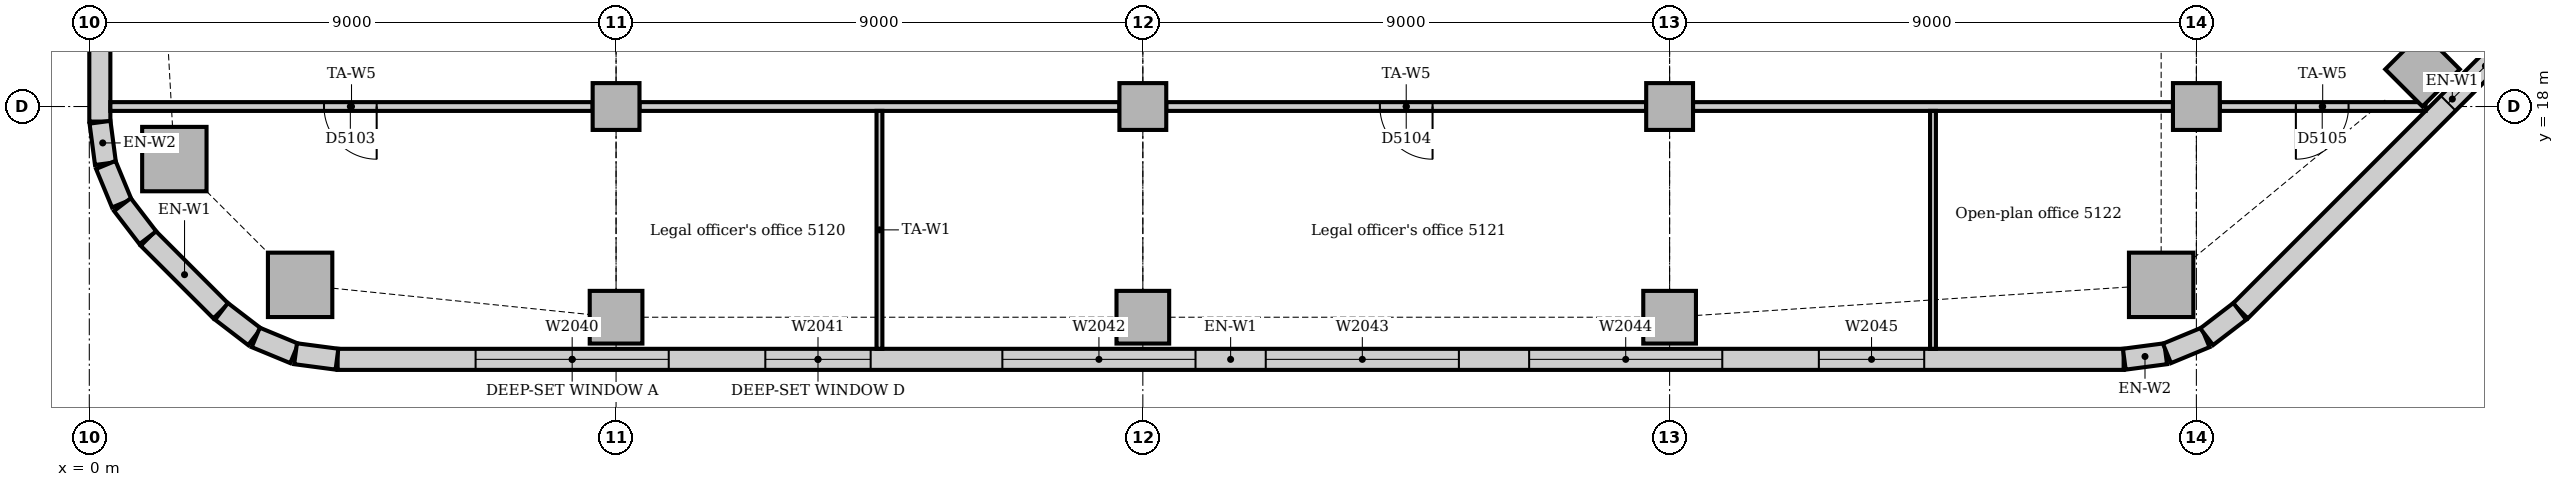
"""IFC4 building model, lengths in metres.
Left out: names, types, materials, properties, quantities, classifications, styles, units other than length and angle.
Written with IfcOpenShell. Run it as: python <this file> out.ifc"""

import sys

from ifc_helpers import new_model, si_unit, direction, frame, frame_2d, origin, origin_2d, place, context, subcontext, project, spatial, rectangle, extrude, element, fill, save


model = new_model("IFC4")
c1 = context("Model", 3, precision=1e-05, world=origin(), true_north=direction((0.0, 1.0)))
c2 = subcontext(c1, "Body", "Model", "MODEL_VIEW")
j1 = project(units=[si_unit("LENGTHUNIT", "METRE"), si_unit("PLANEANGLEUNIT", "RADIAN")], contexts=[c1])
p1 = place(None, origin())
s1 = spatial("IfcSite", under=j1, at=p1, CompositionType="ELEMENT")
p2 = place(p1, origin())
s2 = spatial("IfcBuilding", under=s1, at=p2, CompositionType="ELEMENT")
p3 = place(p2, frame((0.0, 0.0, 214.0)))
s3 = spatial("IfcBuildingStorey", under=s2, at=p3, CompositionType="ELEMENT", Elevation=214.0)
for number, where, z_axis, x_axis in (
    (1, (3.602, 14.953, 0.0), (0.0, 0.0, 1.0), (1.0, 0.0, 0.0)),
    (2, (35.398, 14.953, 0.0), (0.0, 0.0, 1.0), (1.0, 0.0, 0.0)),
    (3, (1.453, 17.102, 0.0), (0.0, 0.0, 1.0), (1.0, 0.0, 0.0)),
):
    element("IfcColumn", number, at=place(p3, frame(where, z_axis=z_axis, x_axis=x_axis)), inside=s3, PredefinedType="COLUMN", context=c2, shape_type="SweptSolid", body=[
        extrude(rectangle(XDim=1.1, YDim=1.1, at=origin_2d()), origin(), (0.0, 0.0, 1.0), 3.85),
    ])
for number, where, z_axis, x_axis in (
    (4, (9.0, 14.4, 0.0), (0.0, 0.0, 1.0), (1.0, 0.0, 0.0)),
    (5, (18.0, 14.4, 0.0), (0.0, 0.0, 1.0), (1.0, 0.0, 0.0)),
    (6, (27.0, 14.4, 0.0), (0.0, 0.0, 1.0), (1.0, 0.0, 0.0)),
    (7, (39.864, 18.636, 0.0), (0.0, 0.0, 1.0), (0.707, 0.707, 0.0)),
):
    element("IfcColumn", number, at=place(p3, frame(where, z_axis=z_axis, x_axis=x_axis)), inside=s3, PredefinedType="COLUMN", context=c2, shape_type="SweptSolid", body=[
        extrude(rectangle(XDim=0.9, YDim=0.9, at=origin_2d()), origin(), (0.0, 0.0, 1.0), 3.85),
    ])
for number, where, z_axis, x_axis in (
    (8, (9.0, 18.0, 0.0), (0.0, 0.0, 1.0), (1.0, 0.0, 0.0)),
    (9, (18.0, 18.0, 0.0), (0.0, 0.0, 1.0), (1.0, 0.0, 0.0)),
    (10, (27.0, 18.0, 0.0), (0.0, 0.0, 1.0), (1.0, 0.0, 0.0)),
    (11, (36.0, 18.0, 0.0), (0.0, 0.0, 1.0), (1.0, 0.0, 0.0)),
):
    element("IfcColumn", number, at=place(p3, frame(where, z_axis=z_axis, x_axis=x_axis)), inside=s3, PredefinedType="COLUMN", context=c2, shape_type="SweptSolid", body=[
        extrude(rectangle(XDim=0.8, YDim=0.8, at=origin_2d()), origin(), (0.0, 0.0, 1.0), 3.85),
    ])
p4 = place(p3, frame((4.243, 13.68, 0.0), z_axis=(0.0, 0.0, 1.0), x_axis=(1.0, 0.0, 0.0)))
e12 = element("IfcWall", 12, at=p4, inside=s3, PredefinedType="STANDARD", context=c2, shape_type="SweptSolid", body=[
    extrude(rectangle(XDim=30.515, YDim=0.36, at=frame_2d((15.257, 0.0))), origin(), (0.0, 0.0, 1.0), 3.85),
])
p5 = place(p4, frame((2.357, 0.0, 0.9)))
e13 = element("IfcOpeningElement", 13, at=p5, cuts=e12, PredefinedType="OPENING", context=c2, shape_type="SweptSolid", body=[
    extrude(rectangle(XDim=3.3, YDim=1.6, at=frame_2d((1.65, 0.8))), frame((0.0, 0.19, 0.0), z_axis=(0.0, -1.0, 0.0), x_axis=(1.0, 0.0, 0.0)), (0.0, 0.0, 1.0), 0.38),
])
p6 = place(p4, frame((7.307, 0.0, 0.9)))
e14 = element("IfcOpeningElement", 14, at=p6, cuts=e12, PredefinedType="OPENING", context=c2, shape_type="SweptSolid", body=[
    extrude(rectangle(XDim=1.8, YDim=1.6, at=frame_2d((0.9, 0.8))), frame((0.0, 0.19, 0.0), z_axis=(0.0, -1.0, 0.0), x_axis=(1.0, 0.0, 0.0)), (0.0, 0.0, 1.0), 0.38),
])
p7 = place(p4, frame((11.357, 0.0, 0.9)))
e15 = element("IfcOpeningElement", 15, at=p7, cuts=e12, PredefinedType="OPENING", context=c2, shape_type="SweptSolid", body=[
    extrude(rectangle(XDim=3.3, YDim=1.6, at=frame_2d((1.65, 0.8))), frame((0.0, 0.19, 0.0), z_axis=(0.0, -1.0, 0.0), x_axis=(1.0, 0.0, 0.0)), (0.0, 0.0, 1.0), 0.38),
])
p8 = place(p4, frame((15.857, 0.0, 0.9)))
e16 = element("IfcOpeningElement", 16, at=p8, cuts=e12, PredefinedType="OPENING", context=c2, shape_type="SweptSolid", body=[
    extrude(rectangle(XDim=3.3, YDim=1.6, at=frame_2d((1.65, 0.8))), frame((0.0, 0.19, 0.0), z_axis=(0.0, -1.0, 0.0), x_axis=(1.0, 0.0, 0.0)), (0.0, 0.0, 1.0), 0.38),
])
p9 = place(p4, frame((20.357, 0.0, 0.9)))
e17 = element("IfcOpeningElement", 17, at=p9, cuts=e12, PredefinedType="OPENING", context=c2, shape_type="SweptSolid", body=[
    extrude(rectangle(XDim=3.3, YDim=1.6, at=frame_2d((1.65, 0.8))), frame((0.0, 0.19, 0.0), z_axis=(0.0, -1.0, 0.0), x_axis=(1.0, 0.0, 0.0)), (0.0, 0.0, 1.0), 0.38),
])
p10 = place(p4, frame((25.307, 0.0, 0.9)))
e18 = element("IfcOpeningElement", 18, at=p10, cuts=e12, PredefinedType="OPENING", context=c2, shape_type="SweptSolid", body=[
    extrude(rectangle(XDim=1.8, YDim=1.6, at=frame_2d((0.9, 0.8))), frame((0.0, 0.19, 0.0), z_axis=(0.0, -1.0, 0.0), x_axis=(1.0, 0.0, 0.0)), (0.0, 0.0, 1.0), 0.38),
])
p11 = place(p3, frame((36.751, 14.506, 0.0), z_axis=(0.0, 0.0, 1.0), x_axis=(0.707106781187, 0.707106781187, 0.0)))
e19 = element("IfcWall", 19, at=p11, inside=s3, PredefinedType="STANDARD", context=c2, shape_type="SweptSolid", body=[
    extrude(rectangle(XDim=10.243, YDim=0.36, at=frame_2d((5.121, 0.0))), origin(), (0.0, 0.0, 1.0), 3.85),
])
p12 = place(p11, frame((5.021, 0.0, 0.9)))
e20 = element("IfcOpeningElement", 20, at=p12, cuts=e19, PredefinedType="OPENING", context=c2, shape_type="SweptSolid", body=[
    extrude(rectangle(XDim=1.8, YDim=1.6, at=frame_2d((0.9, 0.8))), frame((0.0, 0.19, 0.0), z_axis=(0.0, -1.0, 0.0), x_axis=(1.0, 0.0, 0.0)), (0.0, 0.0, 1.0), 0.38),
])
p13 = place(p3, frame((0.18, 21.0, 0.0), z_axis=(0.0, 0.0, 1.0), x_axis=(0.0, -1.0, 0.0)))
e21 = element("IfcWall", 21, at=p13, inside=s3, PredefinedType="STANDARD", context=c2, shape_type="SweptSolid", body=[
    extrude(rectangle(XDim=3.257, YDim=0.36, at=frame_2d((1.629, 0.0))), origin(), (0.0, 0.0, 1.0), 3.85),
])
p14 = place(p3, frame((1.006, 15.749, 0.0), z_axis=(0.0, 0.0, 1.0), x_axis=(0.707106781187, -0.707106781187, 0.0)))
e22 = element("IfcWall", 22, at=p14, inside=s3, PredefinedType="STANDARD", context=c2, shape_type="SweptSolid", body=[
    extrude(rectangle(XDim=1.757, YDim=0.36, at=frame_2d((0.879, 0.0))), origin(), (0.0, 0.0, 1.0), 3.85),
])
for number, where, z_axis, x_axis in (
    (23, (34.769, 13.683, 0.0), (0.0, 0.0, 1.0), (0.991, 0.131, 0.0)),
    (24, (35.497, 13.782, 0.0), (0.0, 0.0, 1.0), (0.924, 0.383, 0.0)),
):
    element("IfcWall", number, at=place(p3, frame(where, z_axis=z_axis, x_axis=x_axis)), inside=s3, PredefinedType="STANDARD", context=c2, shape_type="SweptSolid", body=[
        extrude(rectangle(XDim=0.713, YDim=0.36, at=frame_2d((0.356, 0.0))), origin(), (0.0, 0.0, 1.0), 3.85),
    ])
p15 = place(p3, frame((36.175, 14.066, 0.0), z_axis=(0.0, 0.0, 1.0), x_axis=(0.793321924995, 0.608802368033, 0.0)))
e25 = element("IfcWall", 25, at=p15, inside=s3, PredefinedType="STANDARD", context=c2, shape_type="SweptSolid", body=[
    extrude(rectangle(XDim=0.713, YDim=0.36, at=frame_2d((0.357, 0.0))), origin(), (0.0, 0.0, 1.0), 3.85),
])
for number, where, z_axis, x_axis in (
    (26, (0.183, 17.731, 0.0), (0.0, 0.0, 1.0), (0.131, -0.991, 0.0)),
    (27, (0.282, 17.003, 0.0), (0.0, 0.0, 1.0), (0.383, -0.924, 0.0)),
):
    element("IfcWall", number, at=place(p3, frame(where, z_axis=z_axis, x_axis=x_axis)), inside=s3, PredefinedType="STANDARD", context=c2, shape_type="SweptSolid", body=[
        extrude(rectangle(XDim=0.713, YDim=0.36, at=frame_2d((0.356, 0.0))), origin(), (0.0, 0.0, 1.0), 3.85),
    ])
for number, where, z_axis, x_axis in (
    (28, (0.566, 16.325, 0.0), (0.0, 0.0, 1.0), (0.609, -0.793, 0.0)),
    (29, (2.259, 14.5, 0.0), (0.0, 0.0, 1.0), (0.793, -0.609, 0.0)),
):
    element("IfcWall", number, at=place(p3, frame(where, z_axis=z_axis, x_axis=x_axis)), inside=s3, PredefinedType="STANDARD", context=c2, shape_type="SweptSolid", body=[
        extrude(rectangle(XDim=0.713, YDim=0.36, at=frame_2d((0.357, 0.0))), origin(), (0.0, 0.0, 1.0), 3.85),
    ])
for number, where, z_axis, x_axis in (
    (30, (2.844, 14.055, 0.0), (0.0, 0.0, 1.0), (0.924, -0.383, 0.0)),
    (31, (3.524, 13.776, 0.0), (0.0, 0.0, 1.0), (0.991, -0.131, 0.0)),
):
    element("IfcWall", number, at=place(p3, frame(where, z_axis=z_axis, x_axis=x_axis)), inside=s3, PredefinedType="STANDARD", context=c2, shape_type="SweptSolid", body=[
        extrude(rectangle(XDim=0.713, YDim=0.36, at=frame_2d((0.356, 0.0))), origin(), (0.0, 0.0, 1.0), 3.85),
    ])
p16 = place(p3, frame((36.4, 18.0, 0.0), z_axis=(0.0, 0.0, 1.0), x_axis=(1.0, 0.0, 0.0)))
e32 = element("IfcWall", 32, at=p16, inside=s3, PredefinedType="PARTITIONING", context=c2, shape_type="SweptSolid", body=[
    extrude(rectangle(XDim=3.516, YDim=0.15, at=frame_2d((1.758, 0.0))), origin(), (0.0, 0.0, 1.0), 3.602),
])
p17 = place(p16, frame((1.3, 0.0, 0.0)))
e33 = element("IfcOpeningElement", 33, at=p17, cuts=e32, PredefinedType="OPENING", context=c2, shape_type="SweptSolid", body=[
    extrude(rectangle(XDim=0.9, YDim=2.1, at=frame_2d((0.45, 1.05))), frame((0.0, 0.085, 0.0), z_axis=(0.0, -1.0, 0.0), x_axis=(1.0, 0.0, 0.0)), (0.0, 0.0, 1.0), 0.17),
])
p18 = place(p3, frame((27.4, 18.0, 0.0), z_axis=(0.0, 0.0, 1.0), x_axis=(1.0, 0.0, 0.0)))
e34 = element("IfcWall", 34, at=p18, inside=s3, PredefinedType="PARTITIONING", context=c2, shape_type="SweptSolid", body=[
    extrude(rectangle(XDim=8.2, YDim=0.15, at=frame_2d((4.1, 0.0))), origin(), (0.0, 0.0, 1.0), 3.254),
])
p19 = place(p3, frame((18.4, 18.0, 0.0), z_axis=(0.0, 0.0, 1.0), x_axis=(1.0, 0.0, 0.0)))
e35 = element("IfcWall", 35, at=p19, inside=s3, PredefinedType="PARTITIONING", context=c2, shape_type="SweptSolid", body=[
    extrude(rectangle(XDim=8.2, YDim=0.15, at=frame_2d((4.1, 0.0))), origin(), (0.0, 0.0, 1.0), 3.254),
])
p20 = place(p19, frame((3.65, 0.0, 0.0)))
e36 = element("IfcOpeningElement", 36, at=p20, cuts=e35, PredefinedType="OPENING", context=c2, shape_type="SweptSolid", body=[
    extrude(rectangle(XDim=0.9, YDim=2.1, at=frame_2d((0.45, 1.05))), frame((0.0, 0.085, 0.0), z_axis=(0.0, -1.0, 0.0), x_axis=(1.0, 0.0, 0.0)), (0.0, 0.0, 1.0), 0.17),
])
p21 = place(p3, frame((9.4, 18.0, 0.0), z_axis=(0.0, 0.0, 1.0), x_axis=(1.0, 0.0, 0.0)))
e37 = element("IfcWall", 37, at=p21, inside=s3, PredefinedType="PARTITIONING", context=c2, shape_type="SweptSolid", body=[
    extrude(rectangle(XDim=8.2, YDim=0.15, at=frame_2d((4.1, 0.0))), origin(), (0.0, 0.0, 1.0), 3.254),
])
p22 = place(p3, frame((0.36, 18.0, 0.0), z_axis=(0.0, 0.0, 1.0), x_axis=(1.0, 0.0, 0.0)))
e38 = element("IfcWall", 38, at=p22, inside=s3, PredefinedType="PARTITIONING", context=c2, shape_type="SweptSolid", body=[
    extrude(rectangle(XDim=8.24, YDim=0.15, at=frame_2d((4.12, 0.0))), origin(), (0.0, 0.0, 1.0), 3.254),
])
p23 = place(p22, frame((3.65, 0.0, 0.0)))
e39 = element("IfcOpeningElement", 39, at=p23, cuts=e38, PredefinedType="OPENING", context=c2, shape_type="SweptSolid", body=[
    extrude(rectangle(XDim=0.9, YDim=2.1, at=frame_2d((0.45, 1.05))), frame((0.0, 0.085, 0.0), z_axis=(0.0, -1.0, 0.0), x_axis=(1.0, 0.0, 0.0)), (0.0, 0.0, 1.0), 0.17),
])
for number, where, z_axis, x_axis in (
    (40, (13.5, 13.86, 0.0), (0.0, 0.0, 1.0), (0.0, 1.0, 0.0)),
    (41, (31.5, 13.86, 0.0), (0.0, 0.0, 1.0), (0.0, 1.0, 0.0)),
):
    element("IfcWall", number, at=place(p3, frame(where, z_axis=z_axis, x_axis=x_axis)), inside=s3, PredefinedType="PARTITIONING", context=c2, shape_type="SweptSolid", body=[
        extrude(rectangle(XDim=4.065, YDim=0.1, at=frame_2d((2.033, 0.0))), origin(), (0.0, 0.0, 1.0), 3.85),
    ])
p24 = place(p5, origin())
e42 = element("IfcWindow", 42, at=p24, inside=s3, PartitioningType="SINGLE_PANEL", PredefinedType="WINDOW", context=c2, shape_type="SweptSolid", body=[
    extrude(rectangle(XDim=3.3, YDim=1.6, at=frame_2d((1.65, 0.8))), frame((0.0, 0.13, 0.0), z_axis=(0.0, -1.0, 0.0), x_axis=(1.0, 0.0, 0.0)), (0.0, 0.0, 1.0), 0.06),
])
fill(e13, e42)
p25 = place(p6, origin())
e43 = element("IfcWindow", 43, at=p25, inside=s3, PartitioningType="SINGLE_PANEL", PredefinedType="WINDOW", context=c2, shape_type="SweptSolid", body=[
    extrude(rectangle(XDim=1.8, YDim=1.6, at=frame_2d((0.9, 0.8))), frame((0.0, 0.13, 0.0), z_axis=(0.0, -1.0, 0.0), x_axis=(1.0, 0.0, 0.0)), (0.0, 0.0, 1.0), 0.06),
])
fill(e14, e43)
p26 = place(p7, origin())
e44 = element("IfcWindow", 44, at=p26, inside=s3, PartitioningType="SINGLE_PANEL", PredefinedType="WINDOW", context=c2, shape_type="SweptSolid", body=[
    extrude(rectangle(XDim=3.3, YDim=1.6, at=frame_2d((1.65, 0.8))), frame((0.0, 0.13, 0.0), z_axis=(0.0, -1.0, 0.0), x_axis=(1.0, 0.0, 0.0)), (0.0, 0.0, 1.0), 0.06),
])
fill(e15, e44)
p27 = place(p8, origin())
e45 = element("IfcWindow", 45, at=p27, inside=s3, PartitioningType="SINGLE_PANEL", PredefinedType="WINDOW", context=c2, shape_type="SweptSolid", body=[
    extrude(rectangle(XDim=3.3, YDim=1.6, at=frame_2d((1.65, 0.8))), frame((0.0, 0.13, 0.0), z_axis=(0.0, -1.0, 0.0), x_axis=(1.0, 0.0, 0.0)), (0.0, 0.0, 1.0), 0.06),
])
fill(e16, e45)
p28 = place(p9, origin())
e46 = element("IfcWindow", 46, at=p28, inside=s3, PartitioningType="SINGLE_PANEL", PredefinedType="WINDOW", context=c2, shape_type="SweptSolid", body=[
    extrude(rectangle(XDim=3.3, YDim=1.6, at=frame_2d((1.65, 0.8))), frame((0.0, 0.13, 0.0), z_axis=(0.0, -1.0, 0.0), x_axis=(1.0, 0.0, 0.0)), (0.0, 0.0, 1.0), 0.06),
])
fill(e17, e46)
p29 = place(p10, origin())
e47 = element("IfcWindow", 47, at=p29, inside=s3, PartitioningType="SINGLE_PANEL", PredefinedType="WINDOW", context=c2, shape_type="SweptSolid", body=[
    extrude(rectangle(XDim=1.8, YDim=1.6, at=frame_2d((0.9, 0.8))), frame((0.0, 0.13, 0.0), z_axis=(0.0, -1.0, 0.0), x_axis=(1.0, 0.0, 0.0)), (0.0, 0.0, 1.0), 0.06),
])
fill(e18, e47)
p30 = place(p12, origin())
e48 = element("IfcWindow", 48, at=p30, inside=s3, PartitioningType="SINGLE_PANEL", PredefinedType="WINDOW", context=c2, shape_type="SweptSolid", body=[
    extrude(rectangle(XDim=1.8, YDim=1.6, at=frame_2d((0.9, 0.8))), frame((0.0, 0.13, 0.0), z_axis=(0.0, -1.0, 0.0), x_axis=(1.0, 0.0, 0.0)), (0.0, 0.0, 1.0), 0.06),
])
fill(e20, e48)
p31 = place(p23, frame((0.9, 0.0, 0.0), z_axis=(0.0, 0.0, 1.0), x_axis=(-1.0, 0.0, 0.0)))
e49 = element("IfcDoor", 49, at=p31, inside=s3, OperationType="SINGLE_SWING_LEFT", PredefinedType="DOOR", context=c2, shape_type="SweptSolid", body=[
    extrude(rectangle(XDim=0.9, YDim=2.1, at=frame_2d((0.45, 1.05))), frame((0.0, 0.025, 0.0), z_axis=(0.0, -1.0, 0.0), x_axis=(1.0, 0.0, 0.0)), (0.0, 0.0, 1.0), 0.05),
])
fill(e39, e49)
p32 = place(p20, frame((0.9, 0.0, 0.0), z_axis=(0.0, 0.0, 1.0), x_axis=(-1.0, 0.0, 0.0)))
e50 = element("IfcDoor", 50, at=p32, inside=s3, OperationType="SINGLE_SWING_LEFT", PredefinedType="DOOR", context=c2, shape_type="SweptSolid", body=[
    extrude(rectangle(XDim=0.9, YDim=2.1, at=frame_2d((0.45, 1.05))), frame((0.0, 0.025, 0.0), z_axis=(0.0, -1.0, 0.0), x_axis=(1.0, 0.0, 0.0)), (0.0, 0.0, 1.0), 0.05),
])
fill(e36, e50)
p33 = place(p17, frame((0.9, 0.0, 0.0), z_axis=(0.0, 0.0, 1.0), x_axis=(-1.0, 0.0, 0.0)))
e51 = element("IfcDoor", 51, at=p33, inside=s3, OperationType="SINGLE_SWING_RIGHT", PredefinedType="DOOR", context=c2, shape_type="SweptSolid", body=[
    extrude(rectangle(XDim=0.9, YDim=2.1, at=frame_2d((0.45, 1.05))), frame((0.0, 0.025, 0.0), z_axis=(0.0, -1.0, 0.0), x_axis=(1.0, 0.0, 0.0)), (0.0, 0.0, 1.0), 0.05),
])
fill(e33, e51)
save(model, sys.argv[1])
